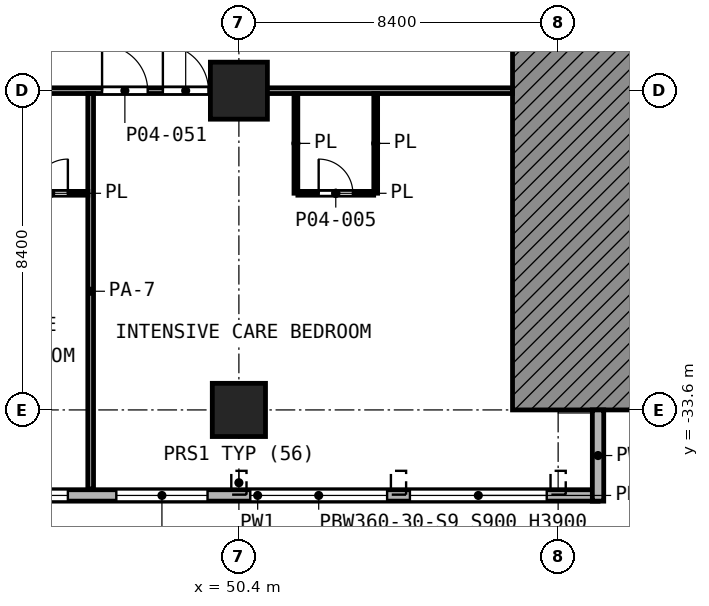
"""IFC4 building model, lengths in metres.
Left out: names, types, materials, properties, quantities, classifications, styles, units other than length and angle.
Written with IfcOpenShell. Run it as: python <this file> out.ifc"""

import sys

from ifc_helpers import new_model, si_unit, direction, frame, frame_2d, origin, origin_2d, place, context, subcontext, project, spatial, polyline, rectangle, outline, extrude, element, fill, save


model = new_model("IFC4")
c1 = context("Model", 3, precision=1e-05, world=origin(), true_north=direction((0.0, 1.0)))
c2 = subcontext(c1, "Body", "Model", "MODEL_VIEW")
j1 = project(units=[si_unit("LENGTHUNIT", "METRE"), si_unit("PLANEANGLEUNIT", "RADIAN")], contexts=[c1])
p1 = place(None, origin())
s1 = spatial("IfcSite", under=j1, at=p1, CompositionType="ELEMENT")
p2 = place(p1, origin())
s2 = spatial("IfcBuilding", under=s1, at=p2, CompositionType="ELEMENT")
p3 = place(p2, frame((0.0, 0.0, 18.2)))
s3 = spatial("IfcBuildingStorey", under=s2, at=p3, CompositionType="ELEMENT", Elevation=18.2)
p4 = place(p3, frame((50.4, -25.2, 0.0), z_axis=(0.0, 0.0, 1.0), x_axis=(1.0, 0.0, 0.0)))
e1 = element("IfcColumn", 1, at=p4, inside=s3, PredefinedType="COLUMN", context=c2, shape_type="SweptSolid", body=[
    extrude(rectangle(XDim=1.5, YDim=1.5, at=origin_2d()), origin(), (0.0, 0.0, 1.0), 5.6),
])
p5 = place(p3, frame((50.4, -33.6, 0.0), z_axis=(0.0, 0.0, 1.0), x_axis=(1.0, 0.0, 0.0)))
e2 = element("IfcColumn", 2, at=p5, inside=s3, PredefinedType="COLUMN", context=c2, shape_type="SweptSolid", body=[
    extrude(rectangle(XDim=1.4, YDim=1.4, at=origin_2d()), origin(), (0.0, 0.0, 1.0), 5.6),
])
p6 = place(p3, frame((0.0, 0.0, -18.2), z_axis=(0.0, -1.0, 0.0), x_axis=(1.0, 0.0, 0.0)))
e3 = element("IfcWall", 3, at=p6, inside=s3, PredefinedType="SHEAR", context=c2, shape_type="SweptSolid", body=[
    extrude(outline(polyline([(67.2, 23.25), (67.2, 22.4), (65.406, 21.022), (63.824, 19.406), (62.938, 18.2), (57.6, 18.2), (57.6, 23.25), (67.2, 23.25)])), origin(), (0.0, 0.0, 1.0), 33.6),
])
p7 = place(p3, frame((41.938, -35.85, 0.0), z_axis=(0.0, 0.0, 1.0), x_axis=(1.0, 0.0, 0.0)))
e4 = element("IfcWall", 4, at=p7, inside=s3, PredefinedType="SOLIDWALL", context=c2, shape_type="SweptSolid", body=[
    extrude(rectangle(XDim=17.912, YDim=0.3, at=frame_2d((8.956, 0.0))), origin(), (0.0, 0.0, 1.0), 5.05),
])
p8 = place(p7, frame((0.362, 0.0, 0.9)))
e5 = element("IfcOpeningElement", 5, at=p8, cuts=e4, PredefinedType="OPENING", context=c2, shape_type="SweptSolid", body=[
    extrude(rectangle(XDim=3.6, YDim=3.0, at=frame_2d((1.8, 1.5))), frame((0.0, 0.16, 0.0), z_axis=(0.0, -1.0, 0.0), x_axis=(1.0, 0.0, 0.0)), (0.0, 0.0, 1.0), 0.32),
])
p9 = place(p7, frame((5.237, 0.0, 0.9)))
e6 = element("IfcOpeningElement", 6, at=p9, cuts=e4, PredefinedType="OPENING", context=c2, shape_type="SweptSolid", body=[
    extrude(rectangle(XDim=2.4, YDim=3.0, at=frame_2d((1.2, 1.5))), frame((0.0, 0.16, 0.0), z_axis=(0.0, -1.0, 0.0), x_axis=(1.0, 0.0, 0.0)), (0.0, 0.0, 1.0), 0.32),
])
p10 = place(p7, frame((8.762, 0.0, 0.9)))
e7 = element("IfcOpeningElement", 7, at=p10, cuts=e4, PredefinedType="OPENING", context=c2, shape_type="SweptSolid", body=[
    extrude(rectangle(XDim=3.6, YDim=3.0, at=frame_2d((1.8, 1.5))), frame((0.0, 0.16, 0.0), z_axis=(0.0, -1.0, 0.0), x_axis=(1.0, 0.0, 0.0)), (0.0, 0.0, 1.0), 0.32),
])
p11 = place(p7, frame((12.962, 0.0, 0.9)))
e8 = element("IfcOpeningElement", 8, at=p11, cuts=e4, PredefinedType="OPENING", context=c2, shape_type="SweptSolid", body=[
    extrude(rectangle(XDim=3.6, YDim=3.0, at=frame_2d((1.8, 1.5))), frame((0.0, 0.16, 0.0), z_axis=(0.0, -1.0, 0.0), x_axis=(1.0, 0.0, 0.0)), (0.0, 0.0, 1.0), 0.32),
])
p12 = place(p3, frame((59.85, -36.0, 0.0), z_axis=(0.0, 0.0, 1.0), x_axis=(0.0, 1.0, 0.0)))
e9 = element("IfcWall", 9, at=p12, inside=s3, PredefinedType="SOLIDWALL", context=c2, shape_type="SweptSolid", body=[
    extrude(rectangle(XDim=2.4, YDim=0.3, at=frame_2d((1.2, 0.0))), origin(), (0.0, 0.0, 1.0), 5.05),
])
p13 = place(p3, frame((44.45, -27.9, 0.0), z_axis=(0.0, 0.0, 1.0), x_axis=(1.0, 0.0, 0.0)))
e10 = element("IfcWall", 10, at=p13, inside=s3, PredefinedType="PARTITIONING", context=c2, shape_type="SweptSolid", body=[
    extrude(rectangle(XDim=1.975, YDim=0.1, at=frame_2d((0.988, 0.0))), origin(), (0.0, 0.0, 1.0), 5.05),
])
p14 = place(p13, frame((0.55, 0.0, 0.0)))
e11 = element("IfcOpeningElement", 11, at=p14, cuts=e10, PredefinedType="OPENING", context=c2, shape_type="SweptSolid", body=[
    extrude(rectangle(XDim=0.9, YDim=2.1, at=frame_2d((0.45, 1.05))), frame((0.0, 0.06, 0.0), z_axis=(0.0, -1.0, 0.0), x_axis=(1.0, 0.0, 0.0)), (0.0, 0.0, 1.0), 0.12),
])
p15 = place(p3, frame((51.952, -27.9, 0.0), z_axis=(0.0, 0.0, 1.0), x_axis=(1.0, 0.0, 0.0)))
e12 = element("IfcWall", 12, at=p15, inside=s3, PredefinedType="PARTITIONING", context=c2, shape_type="SweptSolid", body=[
    extrude(rectangle(XDim=1.995, YDim=0.1, at=frame_2d((0.998, 0.0))), origin(), (0.0, 0.0, 1.0), 5.05),
])
p16 = place(p15, frame((0.547, 0.0, 0.0)))
e13 = element("IfcOpeningElement", 13, at=p16, cuts=e12, PredefinedType="OPENING", context=c2, shape_type="SweptSolid", body=[
    extrude(rectangle(XDim=0.9, YDim=2.1, at=frame_2d((0.45, 1.05))), frame((0.0, 0.06, 0.0), z_axis=(0.0, -1.0, 0.0), x_axis=(1.0, 0.0, 0.0)), (0.0, 0.0, 1.0), 0.12),
])
for number, where, z_axis, x_axis in (
    (14, (51.9, -27.898, 0.0), (0.0, 0.0, 1.0), (0.0, 1.0, 0.0)),
    (15, (54.0, -27.898, 0.0), (0.0, 0.0, 1.0), (0.0, 1.0, 0.0)),
):
    element("IfcWall", number, at=place(p3, frame(where, z_axis=z_axis, x_axis=x_axis)), inside=s3, PredefinedType="PARTITIONING", context=c2, shape_type="SweptSolid", body=[
        extrude(rectangle(XDim=2.623, YDim=0.1, at=frame_2d((1.312, 0.0))), origin(), (0.0, 0.0, 1.0), 5.05),
    ])
p17 = place(p3, frame((25.275, -25.2, 0.0), z_axis=(0.0, 0.0, 1.0), x_axis=(1.0, 0.0, 0.0)))
e16 = element("IfcWall", 16, at=p17, inside=s3, PredefinedType="PARTITIONING", context=c2, shape_type="SweptSolid", body=[
    extrude(rectangle(XDim=32.325, YDim=0.15, at=frame_2d((16.163, 0.0))), origin(), (0.0, 0.0, 1.0), 5.05),
])
p18 = place(p17, frame((5.925, 0.0, 0.0)))
e17 = element("IfcOpeningElement", 17, at=p18, cuts=e16, PredefinedType="OPENING", context=c2, shape_type="SweptSolid", body=[
    extrude(rectangle(XDim=1.2, YDim=2.1, at=frame_2d((0.6, 1.05))), frame((0.0, 0.085, 0.0), z_axis=(0.0, -1.0, 0.0), x_axis=(1.0, 0.0, 0.0)), (0.0, 0.0, 1.0), 0.17),
])
p19 = place(p17, frame((9.675, 0.0, 0.0)))
e18 = element("IfcOpeningElement", 18, at=p19, cuts=e16, PredefinedType="OPENING", context=c2, shape_type="SweptSolid", body=[
    extrude(rectangle(XDim=1.2, YDim=2.1, at=frame_2d((0.6, 1.05))), frame((0.0, 0.085, 0.0), z_axis=(0.0, -1.0, 0.0), x_axis=(1.0, 0.0, 0.0)), (0.0, 0.0, 1.0), 0.17),
])
p20 = place(p17, frame((13.875, 0.0, 0.0)))
e19 = element("IfcOpeningElement", 19, at=p20, cuts=e16, PredefinedType="OPENING", context=c2, shape_type="SweptSolid", body=[
    extrude(rectangle(XDim=1.2, YDim=2.1, at=frame_2d((0.6, 1.05))), frame((0.0, 0.085, 0.0), z_axis=(0.0, -1.0, 0.0), x_axis=(1.0, 0.0, 0.0)), (0.0, 0.0, 1.0), 0.17),
])
p21 = place(p17, frame((17.725, 0.0, 0.0)))
e20 = element("IfcOpeningElement", 20, at=p21, cuts=e16, PredefinedType="OPENING", context=c2, shape_type="SweptSolid", body=[
    extrude(rectangle(XDim=1.2, YDim=2.1, at=frame_2d((0.6, 1.05))), frame((0.0, 0.085, 0.0), z_axis=(0.0, -1.0, 0.0), x_axis=(1.0, 0.0, 0.0)), (0.0, 0.0, 1.0), 0.17),
])
p22 = place(p17, frame((23.125, 0.0, 0.0)))
e21 = element("IfcOpeningElement", 21, at=p22, cuts=e16, PredefinedType="OPENING", context=c2, shape_type="SweptSolid", body=[
    extrude(rectangle(XDim=1.2, YDim=2.1, at=frame_2d((0.6, 1.05))), frame((0.0, 0.085, 0.0), z_axis=(0.0, -1.0, 0.0), x_axis=(1.0, 0.0, 0.0)), (0.0, 0.0, 1.0), 0.17),
])
p23 = place(p17, frame((21.525, 0.0, 0.0)))
e22 = element("IfcOpeningElement", 22, at=p23, cuts=e16, PredefinedType="OPENING", context=c2, shape_type="SweptSolid", body=[
    extrude(rectangle(XDim=1.2, YDim=2.1, at=frame_2d((0.6, 1.05))), frame((0.0, 0.085, 0.0), z_axis=(0.0, -1.0, 0.0), x_axis=(1.0, 0.0, 0.0)), (0.0, 0.0, 1.0), 0.17),
])
p24 = place(p3, frame((46.5, -35.68, 0.0), z_axis=(0.0, 0.0, 1.0), x_axis=(0.0, 1.0, 0.0)))
e23 = element("IfcWall", 23, at=p24, inside=s3, PredefinedType="PARTITIONING", context=c2, shape_type="SweptSolid", body=[
    extrude(rectangle(XDim=10.405, YDim=0.15, at=frame_2d((5.203, 0.0))), origin(), (0.0, 0.0, 1.0), 3.65),
])
p25 = place(p8, origin())
e24 = element("IfcWindow", 24, at=p25, inside=s3, PartitioningType="SINGLE_PANEL", PredefinedType="WINDOW", context=c2, shape_type="SweptSolid", body=[
    extrude(rectangle(XDim=3.6, YDim=3.0, at=frame_2d((1.8, 1.5))), frame((0.0, 0.03, 0.0), z_axis=(0.0, -1.0, 0.0), x_axis=(1.0, 0.0, 0.0)), (0.0, 0.0, 1.0), 0.06),
])
fill(e5, e24)
p26 = place(p9, origin())
e25 = element("IfcWindow", 25, at=p26, inside=s3, PartitioningType="SINGLE_PANEL", PredefinedType="WINDOW", context=c2, shape_type="SweptSolid", body=[
    extrude(rectangle(XDim=2.4, YDim=3.0, at=frame_2d((1.2, 1.5))), frame((0.0, 0.03, 0.0), z_axis=(0.0, -1.0, 0.0), x_axis=(1.0, 0.0, 0.0)), (0.0, 0.0, 1.0), 0.06),
])
fill(e6, e25)
p27 = place(p10, origin())
e26 = element("IfcWindow", 26, at=p27, inside=s3, PartitioningType="SINGLE_PANEL", PredefinedType="WINDOW", context=c2, shape_type="SweptSolid", body=[
    extrude(rectangle(XDim=3.6, YDim=3.0, at=frame_2d((1.8, 1.5))), frame((0.0, 0.03, 0.0), z_axis=(0.0, -1.0, 0.0), x_axis=(1.0, 0.0, 0.0)), (0.0, 0.0, 1.0), 0.06),
])
fill(e7, e26)
p28 = place(p11, origin())
e27 = element("IfcWindow", 27, at=p28, inside=s3, PartitioningType="SINGLE_PANEL", PredefinedType="WINDOW", context=c2, shape_type="SweptSolid", body=[
    extrude(rectangle(XDim=3.6, YDim=3.0, at=frame_2d((1.8, 1.5))), frame((0.0, 0.03, 0.0), z_axis=(0.0, -1.0, 0.0), x_axis=(1.0, 0.0, 0.0)), (0.0, 0.0, 1.0), 0.06),
])
fill(e8, e27)
p29 = place(p14, origin())
e28 = element("IfcDoor", 28, at=p29, inside=s3, OperationType="SINGLE_SWING_RIGHT", PredefinedType="DOOR", context=c2, shape_type="SweptSolid", body=[
    extrude(rectangle(XDim=0.9, YDim=2.1, at=frame_2d((0.45, 1.05))), frame((0.0, 0.025, 0.0), z_axis=(0.0, -1.0, 0.0), x_axis=(1.0, 0.0, 0.0)), (0.0, 0.0, 1.0), 0.05),
])
fill(e11, e28)
p30 = place(p22, origin())
e29 = element("IfcDoor", 29, at=p30, inside=s3, OperationType="SINGLE_SWING_LEFT", PredefinedType="DOOR", context=c2, shape_type="SweptSolid", body=[
    extrude(rectangle(XDim=1.2, YDim=2.1, at=frame_2d((0.6, 1.05))), frame((0.0, 0.025, 0.0), z_axis=(0.0, -1.0, 0.0), x_axis=(1.0, 0.0, 0.0)), (0.0, 0.0, 1.0), 0.05),
])
fill(e21, e29)
p31 = place(p23, origin())
e30 = element("IfcDoor", 30, at=p31, inside=s3, OperationType="SINGLE_SWING_LEFT", PredefinedType="DOOR", context=c2, shape_type="SweptSolid", body=[
    extrude(rectangle(XDim=1.2, YDim=2.1, at=frame_2d((0.6, 1.05))), frame((0.0, 0.025, 0.0), z_axis=(0.0, -1.0, 0.0), x_axis=(1.0, 0.0, 0.0)), (0.0, 0.0, 1.0), 0.05),
])
fill(e22, e30)
p32 = place(p16, origin())
e31 = element("IfcDoor", 31, at=p32, inside=s3, OperationType="SINGLE_SWING_LEFT", PredefinedType="DOOR", context=c2, shape_type="SweptSolid", body=[
    extrude(rectangle(XDim=0.9, YDim=2.1, at=frame_2d((0.45, 1.05))), frame((0.0, 0.025, 0.0), z_axis=(0.0, -1.0, 0.0), x_axis=(1.0, 0.0, 0.0)), (0.0, 0.0, 1.0), 0.05),
])
fill(e13, e31)
save(model, sys.argv[1])
